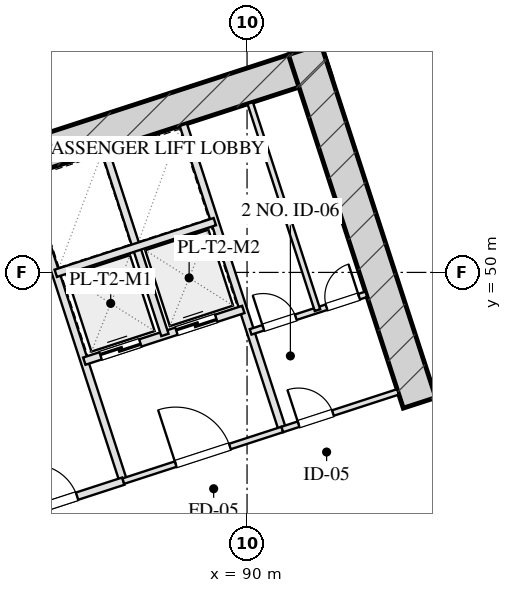
"""IFC4 building model, lengths in metres.
Left out: names, types, materials, properties, quantities, classifications, styles, units other than length and angle.
Written with IfcOpenShell. Run it as: python <this file> out.ifc"""

import sys

from ifc_helpers import new_model, si_unit, direction, frame, frame_2d, origin, place, context, subcontext, project, spatial, rectangle, extrude, element, fill, save


model = new_model("IFC4")
c1 = context("Model", 3, precision=1e-05, world=origin(), true_north=direction((0.0, 1.0)))
c2 = subcontext(c1, "Body", "Model", "MODEL_VIEW")
j1 = project(units=[si_unit("LENGTHUNIT", "METRE"), si_unit("PLANEANGLEUNIT", "RADIAN")], contexts=[c1])
p1 = place(None, origin())
s1 = spatial("IfcSite", under=j1, at=p1, CompositionType="ELEMENT")
p2 = place(p1, origin())
s2 = spatial("IfcBuilding", under=s1, at=p2, CompositionType="ELEMENT")
p3 = place(p2, frame((0.0, 0.0, 22.0)))
s3 = spatial("IfcBuildingStorey", under=s2, at=p3, CompositionType="ELEMENT", Elevation=22.0)
p4 = place(p3, frame((76.201, 50.419, 0.0), z_axis=(0.0, 0.0, 1.0), x_axis=(0.951056412142, 0.309017314926, 0.0)))
e1 = element("IfcWall", 1, at=p4, inside=s3, PredefinedType="SHEAR", context=c2, shape_type="SweptSolid", body=[
    extrude(rectangle(XDim=16.7, YDim=0.9, at=frame_2d((8.35, 0.0))), origin(), (0.0, 0.0, 1.0), 4.0),
])
p5 = place(p3, frame((94.539, 46.568, 0.0), z_axis=(0.0, 0.0, 1.0), x_axis=(-0.309021722829, 0.951054979914, 0.0)))
e2 = element("IfcWall", 2, at=p5, inside=s3, PredefinedType="SHEAR", context=c2, shape_type="SweptSolid", body=[
    extrude(rectangle(XDim=9.78, YDim=0.9, at=frame_2d((4.89, 0.0))), origin(), (0.0, 0.0, 1.0), 4.0),
])
p6 = place(p3, frame((86.743, 44.508, 0.0), z_axis=(0.0, 0.0, 1.0), x_axis=(-0.309016001439, 0.951056838919, 0.0)))
e3 = element("IfcWall", 3, at=p6, inside=s3, PredefinedType="PARTITIONING", context=c2, shape_type="SweptSolid", body=[
    extrude(rectangle(XDim=8.43, YDim=0.2, at=frame_2d((4.215, 0.0))), origin(), (0.0, 0.0, 1.0), 3.725),
])
p7 = place(p3, frame((83.101, 43.324, 0.0), z_axis=(0.0, 0.0, 1.0), x_axis=(0.951052804469, 0.309028417967, 0.0)))
e4 = element("IfcWall", 4, at=p7, inside=s3, PredefinedType="PARTITIONING", context=c2, shape_type="SweptSolid", body=[
    extrude(rectangle(XDim=3.83, YDim=0.2, at=frame_2d((1.915, 0.0))), origin(), (0.0, 0.0, 1.0), 3.725),
])
p8 = place(p7, frame((1.35, 0.0, 0.0)))
e5 = element("IfcOpeningElement", 5, at=p8, cuts=e4, PredefinedType="OPENING", context=c2, shape_type="SweptSolid", body=[
    extrude(rectangle(XDim=1.2, YDim=2.05, at=frame_2d((0.6, 1.025))), frame((0.0, 0.11, 0.0), z_axis=(0.0, -1.0, 0.0), x_axis=(1.0, 0.0, 0.0)), (0.0, 0.0, 1.0), 0.22),
])
p9 = place(p3, frame((90.928, 45.868, 0.0), z_axis=(0.0, 0.0, 1.0), x_axis=(-0.309042196757, 0.951048327176, 0.0)))
e6 = element("IfcWall", 6, at=p9, inside=s3, PredefinedType="PARTITIONING", context=c2, shape_type="SweptSolid", body=[
    extrude(rectangle(XDim=8.43, YDim=0.2, at=frame_2d((4.215, 0.0))), origin(), (0.0, 0.0, 1.0), 3.725),
])
p10 = place(p3, frame((86.743, 44.508, 0.0), z_axis=(0.0, 0.0, 1.0), x_axis=(0.951063829732, 0.308994485023, 0.0)))
e7 = element("IfcWall", 7, at=p10, inside=s3, PredefinedType="PARTITIONING", context=c2, shape_type="SweptSolid", body=[
    extrude(rectangle(XDim=4.4, YDim=0.15, at=frame_2d((2.2, 0.0))), origin(), (0.0, 0.0, 1.0), 3.725),
])
p11 = place(p10, frame((1.45, 0.0, 0.0)))
e8 = element("IfcOpeningElement", 8, at=p11, cuts=e7, PredefinedType="OPENING", context=c2, shape_type="SweptSolid", body=[
    extrude(rectangle(XDim=1.5, YDim=2.05, at=frame_2d((0.75, 1.025))), frame((0.0, 0.085, 0.0), z_axis=(0.0, -1.0, 0.0), x_axis=(1.0, 0.0, 0.0)), (0.0, 0.0, 1.0), 0.17),
])
p12 = place(p3, frame((85.718, 47.666, 0.0), z_axis=(0.0, 0.0, 1.0), x_axis=(0.951058531764, 0.30901079133, 0.0)))
e9 = element("IfcWall", 9, at=p12, inside=s3, PredefinedType="PARTITIONING", context=c2, shape_type="SweptSolid", body=[
    extrude(rectangle(XDim=4.4, YDim=0.2, at=frame_2d((2.2, 0.0))), origin(), (0.0, 0.0, 1.0), 3.725),
])
p13 = place(p12, frame((0.45, 0.0, 0.0)))
e10 = element("IfcOpeningElement", 10, at=p13, cuts=e9, PredefinedType="OPENING", context=c2, shape_type="SweptSolid", body=[
    extrude(rectangle(XDim=1.1, YDim=2.05, at=frame_2d((0.55, 1.025))), frame((0.0, 0.11, 0.0), z_axis=(0.0, -1.0, 0.0), x_axis=(1.0, 0.0, 0.0)), (0.0, 0.0, 1.0), 0.22),
])
p14 = place(p12, frame((2.55, 0.0, 0.0)))
e11 = element("IfcOpeningElement", 11, at=p14, cuts=e9, PredefinedType="OPENING", context=c2, shape_type="SweptSolid", body=[
    extrude(rectangle(XDim=1.1, YDim=2.05, at=frame_2d((0.55, 1.025))), frame((0.0, 0.11, 0.0), z_axis=(0.0, -1.0, 0.0), x_axis=(1.0, 0.0, 0.0)), (0.0, 0.0, 1.0), 0.22),
])
p15 = place(p3, frame((87.838, 48.354, 0.0), z_axis=(0.0, 0.0, 1.0), x_axis=(-0.3090093719, 0.951058992953, 0.0)))
e12 = element("IfcWall", 12, at=p15, inside=s3, PredefinedType="PARTITIONING", context=c2, shape_type="SweptSolid", body=[
    extrude(rectangle(XDim=5.11, YDim=0.2, at=frame_2d((2.555, 0.0))), origin(), (0.0, 0.0, 1.0), 3.725),
])
p16 = place(p3, frame((84.967, 49.977, 0.0), z_axis=(0.0, 0.0, 1.0), x_axis=(0.951063829732, 0.308994485023, 0.0)))
e13 = element("IfcWall", 13, at=p16, inside=s3, PredefinedType="PARTITIONING", context=c2, shape_type="SweptSolid", body=[
    extrude(rectangle(XDim=4.4, YDim=0.2, at=frame_2d((2.2, 0.0))), origin(), (0.0, 0.0, 1.0), 3.725),
])
p17 = place(p3, frame((90.928, 45.868, 0.0), z_axis=(0.0, 0.0, 1.0), x_axis=(0.951059297078, 0.309008435874, 0.0)))
e14 = element("IfcWall", 14, at=p17, inside=s3, PredefinedType="PARTITIONING", context=c2, shape_type="SweptSolid", body=[
    extrude(rectangle(XDim=3.2, YDim=0.15, at=frame_2d((1.6, 0.0))), origin(), (0.0, 0.0, 1.0), 3.725),
])
p18 = place(p17, frame((0.45, 0.0, 0.0)))
e15 = element("IfcOpeningElement", 15, at=p18, cuts=e14, PredefinedType="OPENING", context=c2, shape_type="SweptSolid", body=[
    extrude(rectangle(XDim=0.95, YDim=2.05, at=frame_2d((0.475, 1.025))), frame((0.0, 0.085, 0.0), z_axis=(0.0, -1.0, 0.0), x_axis=(1.0, 0.0, 0.0)), (0.0, 0.0, 1.0), 0.17),
])
p19 = place(p3, frame((90.094, 48.436, 0.0), z_axis=(0.0, 0.0, 1.0), x_axis=(0.951066581729, 0.308986014439, 0.0)))
e16 = element("IfcWall", 16, at=p19, inside=s3, PredefinedType="PARTITIONING", context=c2, shape_type="SweptSolid", body=[
    extrude(rectangle(XDim=3.2, YDim=0.15, at=frame_2d((1.6, 0.0))), origin(), (0.0, 0.0, 1.0), 3.725),
])
p20 = place(p19, frame((0.35, 0.0, 0.0)))
e17 = element("IfcOpeningElement", 17, at=p20, cuts=e16, PredefinedType="OPENING", context=c2, shape_type="SweptSolid", body=[
    extrude(rectangle(XDim=0.9, YDim=2.05, at=frame_2d((0.45, 1.025))), frame((0.0, 0.085, 0.0), z_axis=(0.0, -1.0, 0.0), x_axis=(1.0, 0.0, 0.0)), (0.0, 0.0, 1.0), 0.17),
])
p21 = place(p19, frame((2.1, 0.0, 0.0)))
e18 = element("IfcOpeningElement", 18, at=p21, cuts=e16, PredefinedType="OPENING", context=c2, shape_type="SweptSolid", body=[
    extrude(rectangle(XDim=0.9, YDim=2.05, at=frame_2d((0.45, 1.025))), frame((0.0, 0.085, 0.0), z_axis=(0.0, -1.0, 0.0), x_axis=(1.0, 0.0, 0.0)), (0.0, 0.0, 1.0), 0.17),
])
p22 = place(p3, frame((91.853, 49.007, 0.0), z_axis=(0.0, 0.0, 1.0), x_axis=(-0.309022487551, 0.951054731437, 0.0)))
e19 = element("IfcWall", 19, at=p22, inside=s3, PredefinedType="PARTITIONING", context=c2, shape_type="SweptSolid", body=[
    extrude(rectangle(XDim=5.73, YDim=0.15, at=frame_2d((2.865, 0.0))), origin(), (0.0, 0.0, 1.0), 3.725),
])
p23 = place(p8, origin())
e20 = element("IfcDoor", 20, at=p23, inside=s3, OperationType="SINGLE_SWING_LEFT", PredefinedType="DOOR", context=c2, shape_type="SweptSolid", body=[
    extrude(rectangle(XDim=1.2, YDim=2.05, at=frame_2d((0.6, 1.025))), frame((0.0, 0.025, 0.0), z_axis=(0.0, -1.0, 0.0), x_axis=(1.0, 0.0, 0.0)), (0.0, 0.0, 1.0), 0.05),
])
fill(e5, e20)
p24 = place(p11, origin())
e21 = element("IfcDoor", 21, at=p24, inside=s3, OperationType="SINGLE_SWING_LEFT", PredefinedType="DOOR", context=c2, shape_type="SweptSolid", body=[
    extrude(rectangle(XDim=1.5, YDim=2.05, at=frame_2d((0.75, 1.025))), frame((0.0, 0.025, 0.0), z_axis=(0.0, -1.0, 0.0), x_axis=(1.0, 0.0, 0.0)), (0.0, 0.0, 1.0), 0.05),
])
fill(e8, e21)
p25 = place(p13, origin())
e22 = element("IfcDoor", 22, at=p25, inside=s3, OperationType="DOUBLE_DOOR_SLIDING", PredefinedType="DOOR", context=c2, shape_type="SweptSolid", body=[
    extrude(rectangle(XDim=1.1, YDim=2.05, at=frame_2d((0.55, 1.025))), frame((0.0, 0.025, 0.0), z_axis=(0.0, -1.0, 0.0), x_axis=(1.0, 0.0, 0.0)), (0.0, 0.0, 1.0), 0.05),
])
fill(e10, e22)
p26 = place(p14, origin())
e23 = element("IfcDoor", 23, at=p26, inside=s3, OperationType="DOUBLE_DOOR_SLIDING", PredefinedType="DOOR", context=c2, shape_type="SweptSolid", body=[
    extrude(rectangle(XDim=1.1, YDim=2.05, at=frame_2d((0.55, 1.025))), frame((0.0, 0.025, 0.0), z_axis=(0.0, -1.0, 0.0), x_axis=(1.0, 0.0, 0.0)), (0.0, 0.0, 1.0), 0.05),
])
fill(e11, e23)
p27 = place(p18, origin())
e24 = element("IfcDoor", 24, at=p27, inside=s3, OperationType="SINGLE_SWING_LEFT", PredefinedType="DOOR", context=c2, shape_type="SweptSolid", body=[
    extrude(rectangle(XDim=0.95, YDim=2.05, at=frame_2d((0.475, 1.025))), frame((0.0, 0.025, 0.0), z_axis=(0.0, -1.0, 0.0), x_axis=(1.0, 0.0, 0.0)), (0.0, 0.0, 1.0), 0.05),
])
fill(e15, e24)
p28 = place(p20, origin())
e25 = element("IfcDoor", 25, at=p28, inside=s3, OperationType="SINGLE_SWING_LEFT", PredefinedType="DOOR", context=c2, shape_type="SweptSolid", body=[
    extrude(rectangle(XDim=0.9, YDim=2.05, at=frame_2d((0.45, 1.025))), frame((0.0, 0.025, 0.0), z_axis=(0.0, -1.0, 0.0), x_axis=(1.0, 0.0, 0.0)), (0.0, 0.0, 1.0), 0.05),
])
fill(e17, e25)
p29 = place(p21, origin())
e26 = element("IfcDoor", 26, at=p29, inside=s3, OperationType="SINGLE_SWING_RIGHT", PredefinedType="DOOR", context=c2, shape_type="SweptSolid", body=[
    extrude(rectangle(XDim=0.9, YDim=2.05, at=frame_2d((0.45, 1.025))), frame((0.0, 0.025, 0.0), z_axis=(0.0, -1.0, 0.0), x_axis=(1.0, 0.0, 0.0)), (0.0, 0.0, 1.0), 0.05),
])
fill(e18, e26)
save(model, sys.argv[1])
